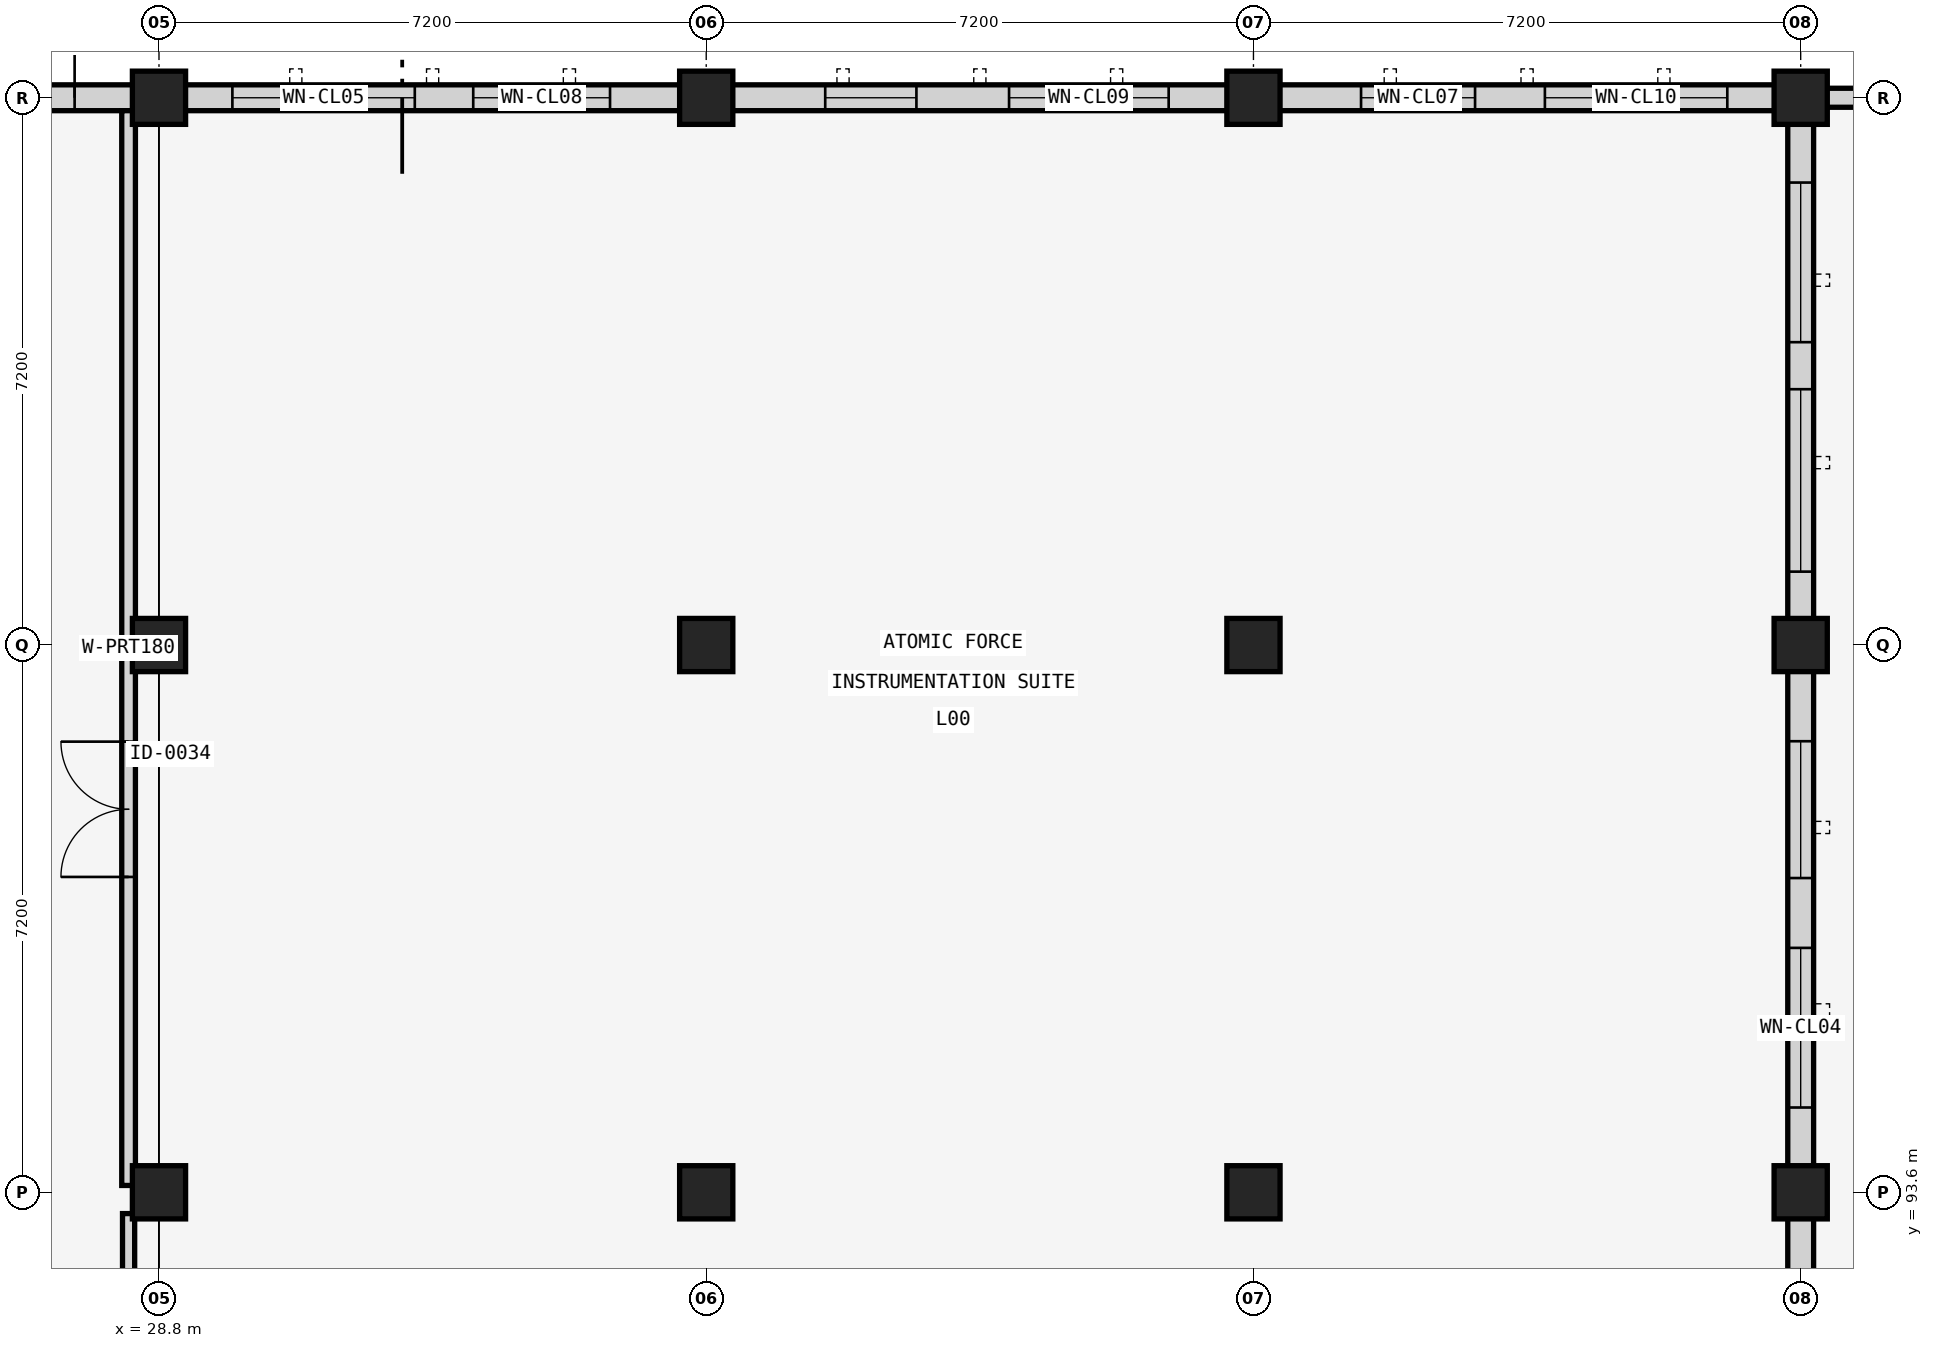
"""IFC4 building model, lengths in metres.
Left out: names, types, materials, properties, quantities, classifications, styles, units other than length and angle.
Written with IfcOpenShell. Run it as: python <this file> out.ifc"""

import sys

from ifc_helpers import new_model, si_unit, direction, frame, frame_2d, origin, origin_2d, place, context, subcontext, project, spatial, rectangle, extrude, element, fill, save


model = new_model("IFC4")
c1 = context("Model", 3, precision=1e-05, world=origin(), true_north=direction((0.0, 1.0)))
c2 = subcontext(c1, "Body", "Model", "MODEL_VIEW")
j1 = project(units=[si_unit("LENGTHUNIT", "METRE"), si_unit("PLANEANGLEUNIT", "RADIAN")], contexts=[c1])
p1 = place(None, origin())
s1 = spatial("IfcSite", under=j1, at=p1, CompositionType="ELEMENT")
p2 = place(p1, origin())
s2 = spatial("IfcBuilding", under=s1, at=p2, CompositionType="ELEMENT")
p3 = place(p2, origin())
s3 = spatial("IfcBuildingStorey", under=s2, at=p3, CompositionType="ELEMENT", Elevation=0.0)
for number, where, z_axis, x_axis in (
    (1, (28.8, 93.6, 0.0), (0.0, 0.0, 1.0), (1.0, 0.0, 0.0)),
    (2, (28.8, 100.8, 0.0), (0.0, 0.0, 1.0), (1.0, 0.0, 0.0)),
    (3, (28.8, 108.0, 0.0), (0.0, 0.0, 1.0), (1.0, 0.0, 0.0)),
    (4, (36.0, 93.6, 0.0), (0.0, 0.0, 1.0), (1.0, 0.0, 0.0)),
    (5, (36.0, 100.8, 0.0), (0.0, 0.0, 1.0), (1.0, 0.0, 0.0)),
    (6, (36.0, 108.0, 0.0), (0.0, 0.0, 1.0), (1.0, 0.0, 0.0)),
    (7, (43.2, 93.6, 0.0), (0.0, 0.0, 1.0), (1.0, 0.0, 0.0)),
    (8, (43.2, 100.8, 0.0), (0.0, 0.0, 1.0), (1.0, 0.0, 0.0)),
    (9, (43.2, 108.0, 0.0), (0.0, 0.0, 1.0), (1.0, 0.0, 0.0)),
    (10, (50.4, 93.6, 0.0), (0.0, 0.0, 1.0), (1.0, 0.0, 0.0)),
    (11, (50.4, 100.8, 0.0), (0.0, 0.0, 1.0), (1.0, 0.0, 0.0)),
    (12, (50.4, 108.0, 0.0), (0.0, 0.0, 1.0), (1.0, 0.0, 0.0)),
):
    element("IfcColumn", number, at=place(p3, frame(where, z_axis=z_axis, x_axis=x_axis)), inside=s3, PredefinedType="COLUMN", context=c2, shape_type="SweptSolid", body=[
        extrude(rectangle(XDim=0.7, YDim=0.7, at=origin_2d()), origin(), (0.0, 0.0, 1.0), 4.8),
    ])
p4 = place(p3, frame((21.94, 108.0, 0.0), z_axis=(0.0, 0.0, 1.0), x_axis=(1.0, 0.0, 0.0)))
e13 = element("IfcWall", 13, at=p4, inside=s3, PredefinedType="SOLIDWALL", context=c2, shape_type="SweptSolid", body=[
    extrude(rectangle(XDim=6.52, YDim=0.34, at=frame_2d((3.26, 0.0))), origin(), (0.0, 0.0, 1.0), 3.75),
])
p5 = place(p4, frame((3.95, 0.0, 0.0)))
e14 = element("IfcOpeningElement", 14, at=p5, cuts=e13, PredefinedType="OPENING", context=c2, shape_type="SweptSolid", body=[
    extrude(rectangle(XDim=1.8, YDim=2.4, at=frame_2d((0.9, 1.2))), frame((0.0, 0.18, 0.0), z_axis=(0.0, -1.0, 0.0), x_axis=(1.0, 0.0, 0.0)), (0.0, 0.0, 1.0), 0.36),
])
p6 = place(p3, frame((29.14, 108.0, 0.0), z_axis=(0.0, 0.0, 1.0), x_axis=(1.0, 0.0, 0.0)))
e15 = element("IfcWall", 15, at=p6, inside=s3, PredefinedType="SOLIDWALL", context=c2, shape_type="SweptSolid", body=[
    extrude(rectangle(XDim=6.52, YDim=0.34, at=frame_2d((3.26, 0.0))), origin(), (0.0, 0.0, 1.0), 3.75),
])
p7 = place(p6, frame((0.625, 0.0, 1.0)))
e16 = element("IfcOpeningElement", 16, at=p7, cuts=e15, PredefinedType="OPENING", context=c2, shape_type="SweptSolid", body=[
    extrude(rectangle(XDim=2.4, YDim=1.5, at=frame_2d((1.2, 0.75))), frame((0.0, 0.18, 0.0), z_axis=(0.0, -1.0, 0.0), x_axis=(1.0, 0.0, 0.0)), (0.0, 0.0, 1.0), 0.36),
])
p8 = place(p6, frame((3.794, 0.0, 1.0)))
e17 = element("IfcOpeningElement", 17, at=p8, cuts=e15, PredefinedType="OPENING", context=c2, shape_type="SweptSolid", body=[
    extrude(rectangle(XDim=1.8, YDim=1.65, at=frame_2d((0.9, 0.825))), frame((0.0, 0.18, 0.0), z_axis=(0.0, -1.0, 0.0), x_axis=(1.0, 0.0, 0.0)), (0.0, 0.0, 1.0), 0.36),
])
p9 = place(p3, frame((36.34, 108.0, 0.0), z_axis=(0.0, 0.0, 1.0), x_axis=(1.0, 0.0, 0.0)))
e18 = element("IfcWall", 18, at=p9, inside=s3, PredefinedType="SOLIDWALL", context=c2, shape_type="SweptSolid", body=[
    extrude(rectangle(XDim=6.52, YDim=0.34, at=frame_2d((3.26, 0.0))), origin(), (0.0, 0.0, 1.0), 3.75),
])
p10 = place(p9, frame((1.226, 0.0, 1.0)))
e19 = element("IfcOpeningElement", 19, at=p10, cuts=e18, PredefinedType="OPENING", context=c2, shape_type="SweptSolid", body=[
    extrude(rectangle(XDim=1.2, YDim=1.65, at=frame_2d((0.6, 0.825))), frame((0.0, 0.18, 0.0), z_axis=(0.0, -1.0, 0.0), x_axis=(1.0, 0.0, 0.0)), (0.0, 0.0, 1.0), 0.36),
])
p11 = place(p9, frame((3.644, 0.0, 1.0)))
e20 = element("IfcOpeningElement", 20, at=p11, cuts=e18, PredefinedType="OPENING", context=c2, shape_type="SweptSolid", body=[
    extrude(rectangle(XDim=2.1, YDim=1.65, at=frame_2d((1.05, 0.825))), frame((0.0, 0.18, 0.0), z_axis=(0.0, -1.0, 0.0), x_axis=(1.0, 0.0, 0.0)), (0.0, 0.0, 1.0), 0.36),
])
p12 = place(p3, frame((43.54, 108.0, 0.0), z_axis=(0.0, 0.0, 1.0), x_axis=(1.0, 0.0, 0.0)))
e21 = element("IfcWall", 21, at=p12, inside=s3, PredefinedType="SOLIDWALL", context=c2, shape_type="SweptSolid", body=[
    extrude(rectangle(XDim=6.52, YDim=0.34, at=frame_2d((3.26, 0.0))), origin(), (0.0, 0.0, 1.0), 3.75),
])
p13 = place(p12, frame((1.076, 0.0, 1.0)))
e22 = element("IfcOpeningElement", 22, at=p13, cuts=e21, PredefinedType="OPENING", context=c2, shape_type="SweptSolid", body=[
    extrude(rectangle(XDim=1.5, YDim=1.65, at=frame_2d((0.75, 0.825))), frame((0.0, 0.18, 0.0), z_axis=(0.0, -1.0, 0.0), x_axis=(1.0, 0.0, 0.0)), (0.0, 0.0, 1.0), 0.36),
])
p14 = place(p12, frame((3.494, 0.0, 1.0)))
e23 = element("IfcOpeningElement", 23, at=p14, cuts=e21, PredefinedType="OPENING", context=c2, shape_type="SweptSolid", body=[
    extrude(rectangle(XDim=2.4, YDim=1.65, at=frame_2d((1.2, 0.825))), frame((0.0, 0.18, 0.0), z_axis=(0.0, -1.0, 0.0), x_axis=(1.0, 0.0, 0.0)), (0.0, 0.0, 1.0), 0.36),
])
p15 = place(p3, frame((50.4, 86.74, 0.0), z_axis=(0.0, 0.0, 1.0), x_axis=(0.0, 1.0, 0.0)))
e24 = element("IfcWall", 24, at=p15, inside=s3, PredefinedType="SOLIDWALL", context=c2, shape_type="SweptSolid", body=[
    extrude(rectangle(XDim=6.52, YDim=0.34, at=frame_2d((3.26, 0.0))), origin(), (0.0, 0.0, 1.0), 3.75),
])
p16 = place(p15, frame((2.31, 0.0, 0.0)))
e25 = element("IfcOpeningElement", 25, at=p16, cuts=e24, PredefinedType="OPENING", context=c2, shape_type="SweptSolid", body=[
    extrude(rectangle(XDim=1.9, YDim=2.35, at=frame_2d((0.95, 1.175))), frame((0.0, 0.18, 0.0), z_axis=(0.0, -1.0, 0.0), x_axis=(1.0, 0.0, 0.0)), (0.0, 0.0, 1.0), 0.36),
])
p17 = place(p3, frame((50.4, 93.94, 0.0), z_axis=(0.0, 0.0, 1.0), x_axis=(0.0, 1.0, 0.0)))
e26 = element("IfcWall", 26, at=p17, inside=s3, PredefinedType="SOLIDWALL", context=c2, shape_type="SweptSolid", body=[
    extrude(rectangle(XDim=6.52, YDim=0.34, at=frame_2d((3.26, 0.0))), origin(), (0.0, 0.0, 1.0), 3.75),
])
p18 = place(p17, frame((0.776, 0.0, 1.0)))
e27 = element("IfcOpeningElement", 27, at=p18, cuts=e26, PredefinedType="OPENING", context=c2, shape_type="SweptSolid", body=[
    extrude(rectangle(XDim=2.1, YDim=1.5, at=frame_2d((1.05, 0.75))), frame((0.0, 0.18, 0.0), z_axis=(0.0, -1.0, 0.0), x_axis=(1.0, 0.0, 0.0)), (0.0, 0.0, 1.0), 0.36),
])
p19 = place(p17, frame((3.794, 0.0, 1.0)))
e28 = element("IfcOpeningElement", 28, at=p19, cuts=e26, PredefinedType="OPENING", context=c2, shape_type="SweptSolid", body=[
    extrude(rectangle(XDim=1.8, YDim=1.65, at=frame_2d((0.9, 0.825))), frame((0.0, 0.18, 0.0), z_axis=(0.0, -1.0, 0.0), x_axis=(1.0, 0.0, 0.0)), (0.0, 0.0, 1.0), 0.36),
])
p20 = place(p3, frame((50.4, 101.14, 0.0), z_axis=(0.0, 0.0, 1.0), x_axis=(0.0, 1.0, 0.0)))
e29 = element("IfcWall", 29, at=p20, inside=s3, PredefinedType="SOLIDWALL", context=c2, shape_type="SweptSolid", body=[
    extrude(rectangle(XDim=6.52, YDim=0.34, at=frame_2d((3.26, 0.0))), origin(), (0.0, 0.0, 1.0), 3.75),
])
p21 = place(p20, frame((0.625, 0.0, 1.0)))
e30 = element("IfcOpeningElement", 30, at=p21, cuts=e29, PredefinedType="OPENING", context=c2, shape_type="SweptSolid", body=[
    extrude(rectangle(XDim=2.4, YDim=1.5, at=frame_2d((1.2, 0.75))), frame((0.0, 0.18, 0.0), z_axis=(0.0, -1.0, 0.0), x_axis=(1.0, 0.0, 0.0)), (0.0, 0.0, 1.0), 0.36),
])
p22 = place(p20, frame((3.644, 0.0, 1.0)))
e31 = element("IfcOpeningElement", 31, at=p22, cuts=e29, PredefinedType="OPENING", context=c2, shape_type="SweptSolid", body=[
    extrude(rectangle(XDim=2.1, YDim=1.65, at=frame_2d((1.05, 0.825))), frame((0.0, 0.18, 0.0), z_axis=(0.0, -1.0, 0.0), x_axis=(1.0, 0.0, 0.0)), (0.0, 0.0, 1.0), 0.36),
])
p23 = place(p3, frame((50.4, 108.0, 0.0), z_axis=(0.0, 0.0, 1.0), x_axis=(1.0, 0.0, 0.0)))
e32 = element("IfcWall", 32, at=p23, inside=s3, PredefinedType="PARAPET", context=c2, shape_type="SweptSolid", body=[
    extrude(rectangle(XDim=79.2, YDim=0.25, at=frame_2d((39.6, 0.0))), origin(), (0.0, 0.0, 1.0), 1.1),
])
p24 = place(p3, frame((28.4, 79.08, 0.0), z_axis=(0.0, 0.0, 1.0), x_axis=(0.0, 1.0, 0.0)))
e33 = element("IfcWall", 33, at=p24, inside=s3, PredefinedType="PARTITIONING", context=c2, shape_type="SweptSolid", body=[
    extrude(rectangle(XDim=14.24, YDim=0.16, at=frame_2d((7.12, 0.0))), origin(), (0.0, 0.0, 1.0), 3.75),
])
p25 = place(p24, frame((4.484, 0.0, 0.0)))
e34 = element("IfcOpeningElement", 34, at=p25, cuts=e33, PredefinedType="OPENING", context=c2, shape_type="SweptSolid", body=[
    extrude(rectangle(XDim=1.0, YDim=2.15, at=frame_2d((0.5, 1.075))), frame((0.0, 0.09, 0.0), z_axis=(0.0, -1.0, 0.0), x_axis=(1.0, 0.0, 0.0)), (0.0, 0.0, 1.0), 0.18),
])
p26 = place(p3, frame((28.4, 93.69, 0.0), z_axis=(0.0, 0.0, 1.0), x_axis=(0.0, 1.0, 0.0)))
e35 = element("IfcWall", 35, at=p26, inside=s3, PredefinedType="PARTITIONING", context=c2, shape_type="SweptSolid", body=[
    extrude(rectangle(XDim=14.14, YDim=0.18, at=frame_2d((7.07, 0.0))), origin(), (0.0, 0.0, 1.0), 3.75),
])
p27 = place(p26, frame((4.059, 0.0, 0.0)))
e36 = element("IfcOpeningElement", 36, at=p27, cuts=e35, PredefinedType="OPENING", context=c2, shape_type="SweptSolid", body=[
    extrude(rectangle(XDim=1.78, YDim=2.26, at=frame_2d((0.89, 1.13))), frame((0.0, 0.1, 0.0), z_axis=(0.0, -1.0, 0.0), x_axis=(1.0, 0.0, 0.0)), (0.0, 0.0, 1.0), 0.2),
])
p28 = place(p5, origin())
e37 = element("IfcDoor", 37, at=p28, inside=s3, OperationType="DOUBLE_DOOR_SINGLE_SWING", PredefinedType="DOOR", context=c2, shape_type="SweptSolid", body=[
    extrude(rectangle(XDim=1.8, YDim=2.4, at=frame_2d((0.9, 1.2))), frame((0.0, 0.025, 0.0), z_axis=(0.0, -1.0, 0.0), x_axis=(1.0, 0.0, 0.0)), (0.0, 0.0, 1.0), 0.05),
])
fill(e14, e37)
p29 = place(p7, origin())
e38 = element("IfcWindow", 38, at=p29, inside=s3, PartitioningType="SINGLE_PANEL", PredefinedType="WINDOW", context=c2, shape_type="SweptSolid", body=[
    extrude(rectangle(XDim=2.4, YDim=1.5, at=frame_2d((1.2, 0.75))), frame((0.0, 0.03, 0.0), z_axis=(0.0, -1.0, 0.0), x_axis=(1.0, 0.0, 0.0)), (0.0, 0.0, 1.0), 0.06),
])
fill(e16, e38)
p30 = place(p8, origin())
e39 = element("IfcWindow", 39, at=p30, inside=s3, PartitioningType="SINGLE_PANEL", PredefinedType="WINDOW", context=c2, shape_type="SweptSolid", body=[
    extrude(rectangle(XDim=1.8, YDim=1.65, at=frame_2d((0.9, 0.825))), frame((0.0, 0.03, 0.0), z_axis=(0.0, -1.0, 0.0), x_axis=(1.0, 0.0, 0.0)), (0.0, 0.0, 1.0), 0.06),
])
fill(e17, e39)
p31 = place(p10, origin())
e40 = element("IfcWindow", 40, at=p31, inside=s3, PartitioningType="SINGLE_PANEL", PredefinedType="WINDOW", context=c2, shape_type="SweptSolid", body=[
    extrude(rectangle(XDim=1.2, YDim=1.65, at=frame_2d((0.6, 0.825))), frame((0.0, 0.03, 0.0), z_axis=(0.0, -1.0, 0.0), x_axis=(1.0, 0.0, 0.0)), (0.0, 0.0, 1.0), 0.06),
])
fill(e19, e40)
p32 = place(p11, origin())
e41 = element("IfcWindow", 41, at=p32, inside=s3, PartitioningType="SINGLE_PANEL", PredefinedType="WINDOW", context=c2, shape_type="SweptSolid", body=[
    extrude(rectangle(XDim=2.1, YDim=1.65, at=frame_2d((1.05, 0.825))), frame((0.0, 0.03, 0.0), z_axis=(0.0, -1.0, 0.0), x_axis=(1.0, 0.0, 0.0)), (0.0, 0.0, 1.0), 0.06),
])
fill(e20, e41)
p33 = place(p13, origin())
e42 = element("IfcWindow", 42, at=p33, inside=s3, PartitioningType="SINGLE_PANEL", PredefinedType="WINDOW", context=c2, shape_type="SweptSolid", body=[
    extrude(rectangle(XDim=1.5, YDim=1.65, at=frame_2d((0.75, 0.825))), frame((0.0, 0.03, 0.0), z_axis=(0.0, -1.0, 0.0), x_axis=(1.0, 0.0, 0.0)), (0.0, 0.0, 1.0), 0.06),
])
fill(e22, e42)
p34 = place(p14, origin())
e43 = element("IfcWindow", 43, at=p34, inside=s3, PartitioningType="SINGLE_PANEL", PredefinedType="WINDOW", context=c2, shape_type="SweptSolid", body=[
    extrude(rectangle(XDim=2.4, YDim=1.65, at=frame_2d((1.2, 0.825))), frame((0.0, 0.03, 0.0), z_axis=(0.0, -1.0, 0.0), x_axis=(1.0, 0.0, 0.0)), (0.0, 0.0, 1.0), 0.06),
])
fill(e23, e43)
p35 = place(p18, origin())
e44 = element("IfcWindow", 44, at=p35, inside=s3, PartitioningType="SINGLE_PANEL", PredefinedType="WINDOW", context=c2, shape_type="SweptSolid", body=[
    extrude(rectangle(XDim=2.1, YDim=1.5, at=frame_2d((1.05, 0.75))), frame((0.0, 0.03, 0.0), z_axis=(0.0, -1.0, 0.0), x_axis=(1.0, 0.0, 0.0)), (0.0, 0.0, 1.0), 0.06),
])
fill(e27, e44)
p36 = place(p19, origin())
e45 = element("IfcWindow", 45, at=p36, inside=s3, PartitioningType="SINGLE_PANEL", PredefinedType="WINDOW", context=c2, shape_type="SweptSolid", body=[
    extrude(rectangle(XDim=1.8, YDim=1.65, at=frame_2d((0.9, 0.825))), frame((0.0, 0.03, 0.0), z_axis=(0.0, -1.0, 0.0), x_axis=(1.0, 0.0, 0.0)), (0.0, 0.0, 1.0), 0.06),
])
fill(e28, e45)
p37 = place(p21, origin())
e46 = element("IfcWindow", 46, at=p37, inside=s3, PartitioningType="SINGLE_PANEL", PredefinedType="WINDOW", context=c2, shape_type="SweptSolid", body=[
    extrude(rectangle(XDim=2.4, YDim=1.5, at=frame_2d((1.2, 0.75))), frame((0.0, 0.03, 0.0), z_axis=(0.0, -1.0, 0.0), x_axis=(1.0, 0.0, 0.0)), (0.0, 0.0, 1.0), 0.06),
])
fill(e30, e46)
p38 = place(p22, origin())
e47 = element("IfcWindow", 47, at=p38, inside=s3, PartitioningType="SINGLE_PANEL", PredefinedType="WINDOW", context=c2, shape_type="SweptSolid", body=[
    extrude(rectangle(XDim=2.1, YDim=1.65, at=frame_2d((1.05, 0.825))), frame((0.0, 0.03, 0.0), z_axis=(0.0, -1.0, 0.0), x_axis=(1.0, 0.0, 0.0)), (0.0, 0.0, 1.0), 0.06),
])
fill(e31, e47)
p39 = place(p27, origin())
e48 = element("IfcDoor", 48, at=p39, inside=s3, OperationType="DOUBLE_DOOR_SINGLE_SWING", PredefinedType="DOOR", context=c2, shape_type="SweptSolid", body=[
    extrude(rectangle(XDim=1.78, YDim=2.26, at=frame_2d((0.89, 1.13))), frame((0.0, 0.025, 0.0), z_axis=(0.0, -1.0, 0.0), x_axis=(1.0, 0.0, 0.0)), (0.0, 0.0, 1.0), 0.05),
])
fill(e36, e48)
save(model, sys.argv[1])
